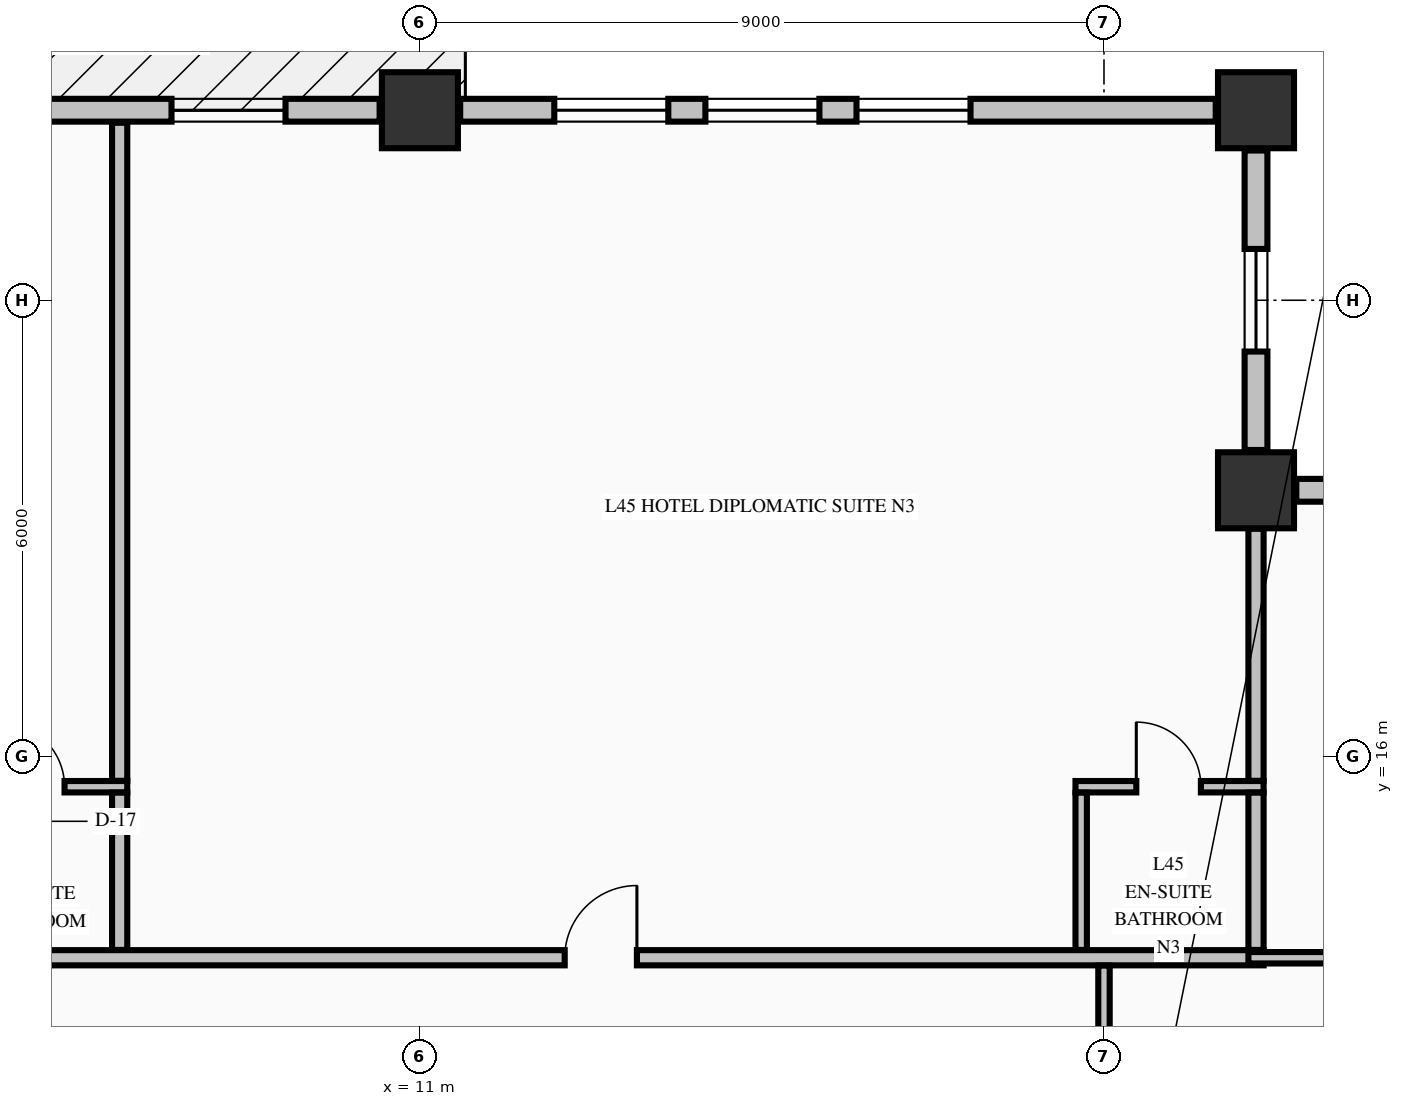
"""IFC4 building model, lengths in metres.
Left out: names, types, materials, properties, quantities, classifications, styles, units other than length and angle.
Written with IfcOpenShell. Run it as: python <this file> out.ifc"""

import sys

from ifc_helpers import new_model, si_unit, direction, frame, frame_2d, origin, origin_2d, place, context, subcontext, project, spatial, rectangle, extrude, element, fill, save


model = new_model("IFC4")
c1 = context("Model", 3, precision=1e-05, world=origin(), true_north=direction((0.0, 1.0)))
c2 = subcontext(c1, "Body", "Model", "MODEL_VIEW")
j1 = project(units=[si_unit("LENGTHUNIT", "METRE"), si_unit("PLANEANGLEUNIT", "RADIAN")], contexts=[c1])
p1 = place(None, origin())
s1 = spatial("IfcSite", under=j1, at=p1, CompositionType="ELEMENT")
p2 = place(p1, origin())
s2 = spatial("IfcBuilding", under=s1, at=p2, CompositionType="ELEMENT")
p3 = place(p2, frame((0.0, 0.0, 176.26)))
s3 = spatial("IfcBuildingStorey", under=s2, at=p3, CompositionType="ELEMENT", Elevation=176.26)
for number, where, z_axis, x_axis in (
    (1, (11.0, 24.5, -0.275), (0.0, 0.0, 1.0), (1.0, 0.0, 0.0)),
    (2, (22.0, 24.5, -0.275), (0.0, 0.0, 1.0), (1.0, 0.0, 0.0)),
    (3, (22.0, 19.5, -0.275), (0.0, 0.0, 1.0), (1.0, 0.0, 0.0)),
):
    element("IfcColumn", number, at=place(p3, frame(where, z_axis=z_axis, x_axis=x_axis)), inside=s3, PredefinedType="COLUMN", context=c2, shape_type="SweptSolid", body=[
        extrude(rectangle(XDim=1.0, YDim=1.0, at=origin_2d()), origin(), (0.0, 0.0, 1.0), 3.425),
    ])
p4 = place(p3, frame((26.47, 19.5, 0.0), z_axis=(0.0, 0.0, 1.0), x_axis=(-1.0, 0.0, 0.0)))
e4 = element("IfcWall", 4, at=p4, inside=s3, PredefinedType="STANDARD", context=c2, shape_type="SweptSolid", body=[
    extrude(rectangle(XDim=3.94, YDim=0.3, at=frame_2d((1.97, 0.0))), origin(), (0.0, 0.0, 1.0), 2.542),
])
p5 = place(p4, frame((1.295, 0.0, 0.68)))
e5 = element("IfcOpeningElement", 5, at=p5, cuts=e4, PredefinedType="OPENING", context=c2, shape_type="SweptSolid", body=[
    extrude(rectangle(XDim=1.35, YDim=1.42, at=frame_2d((0.675, 0.71))), frame((0.0, 0.16, 0.0), z_axis=(0.0, -1.0, 0.0), x_axis=(1.0, 0.0, 0.0)), (0.0, 0.0, 1.0), 0.32),
])
p6 = place(p3, frame((22.0, 20.03, 0.0), z_axis=(0.0, 0.0, 1.0), x_axis=(0.0, 1.0, 0.0)))
e6 = element("IfcWall", 6, at=p6, inside=s3, PredefinedType="STANDARD", context=c2, shape_type="SweptSolid", body=[
    extrude(rectangle(XDim=3.94, YDim=0.3, at=frame_2d((1.97, 0.0))), origin(), (0.0, 0.0, 1.0), 2.542),
])
p7 = place(p6, frame((1.295, 0.0, 0.68)))
e7 = element("IfcOpeningElement", 7, at=p7, cuts=e6, PredefinedType="OPENING", context=c2, shape_type="SweptSolid", body=[
    extrude(rectangle(XDim=1.35, YDim=1.42, at=frame_2d((0.675, 0.71))), frame((0.0, 0.16, 0.0), z_axis=(0.0, -1.0, 0.0), x_axis=(1.0, 0.0, 0.0)), (0.0, 0.0, 1.0), 0.32),
])
p8 = place(p3, frame((10.47, 24.5, 0.0), z_axis=(0.0, 0.0, 1.0), x_axis=(-1.0, 0.0, 0.0)))
e8 = element("IfcWall", 8, at=p8, inside=s3, PredefinedType="STANDARD", context=c2, shape_type="SweptSolid", body=[
    extrude(rectangle(XDim=9.94, YDim=0.3, at=frame_2d((4.97, 0.0))), origin(), (0.0, 0.0, 1.0), 2.542),
])
p9 = place(p8, frame((1.238, 0.0, 0.72)))
e9 = element("IfcOpeningElement", 9, at=p9, cuts=e8, PredefinedType="OPENING", context=c2, shape_type="SweptSolid", body=[
    extrude(rectangle(XDim=1.5, YDim=1.6, at=frame_2d((0.75, 0.8))), frame((0.0, 0.16, 0.0), z_axis=(0.0, -1.0, 0.0), x_axis=(1.0, 0.0, 0.0)), (0.0, 0.0, 1.0), 0.32),
])
p10 = place(p8, frame((5.214, 0.0, 0.72)))
e10 = element("IfcOpeningElement", 10, at=p10, cuts=e8, PredefinedType="OPENING", context=c2, shape_type="SweptSolid", body=[
    extrude(rectangle(XDim=1.5, YDim=1.6, at=frame_2d((0.75, 0.8))), frame((0.0, 0.16, 0.0), z_axis=(0.0, -1.0, 0.0), x_axis=(1.0, 0.0, 0.0)), (0.0, 0.0, 1.0), 0.32),
])
p11 = place(p8, frame((7.202, 0.0, 0.72)))
e11 = element("IfcOpeningElement", 11, at=p11, cuts=e8, PredefinedType="OPENING", context=c2, shape_type="SweptSolid", body=[
    extrude(rectangle(XDim=1.5, YDim=1.6, at=frame_2d((0.75, 0.8))), frame((0.0, 0.16, 0.0), z_axis=(0.0, -1.0, 0.0), x_axis=(1.0, 0.0, 0.0)), (0.0, 0.0, 1.0), 0.32),
])
p12 = place(p3, frame((21.47, 24.5, 0.0), z_axis=(0.0, 0.0, 1.0), x_axis=(-1.0, 0.0, 0.0)))
e12 = element("IfcWall", 12, at=p12, inside=s3, PredefinedType="STANDARD", context=c2, shape_type="SweptSolid", body=[
    extrude(rectangle(XDim=9.94, YDim=0.3, at=frame_2d((4.97, 0.0))), origin(), (0.0, 0.0, 1.0), 2.542),
])
p13 = place(p12, frame((3.226, 0.0, 0.72)))
e13 = element("IfcOpeningElement", 13, at=p13, cuts=e12, PredefinedType="OPENING", context=c2, shape_type="SweptSolid", body=[
    extrude(rectangle(XDim=1.5, YDim=1.6, at=frame_2d((0.75, 0.8))), frame((0.0, 0.16, 0.0), z_axis=(0.0, -1.0, 0.0), x_axis=(1.0, 0.0, 0.0)), (0.0, 0.0, 1.0), 0.32),
])
p14 = place(p12, frame((5.214, 0.0, 0.72)))
e14 = element("IfcOpeningElement", 14, at=p14, cuts=e12, PredefinedType="OPENING", context=c2, shape_type="SweptSolid", body=[
    extrude(rectangle(XDim=1.5, YDim=1.6, at=frame_2d((0.75, 0.8))), frame((0.0, 0.16, 0.0), z_axis=(0.0, -1.0, 0.0), x_axis=(1.0, 0.0, 0.0)), (0.0, 0.0, 1.0), 0.32),
])
p15 = place(p12, frame((7.202, 0.0, 0.72)))
e15 = element("IfcOpeningElement", 15, at=p15, cuts=e12, PredefinedType="OPENING", context=c2, shape_type="SweptSolid", body=[
    extrude(rectangle(XDim=1.5, YDim=1.6, at=frame_2d((0.75, 0.8))), frame((0.0, 0.16, 0.0), z_axis=(0.0, -1.0, 0.0), x_axis=(1.0, 0.0, 0.0)), (0.0, 0.0, 1.0), 0.32),
])
p16 = place(p3, frame((-17.1, 13.35, 0.0), z_axis=(0.0, 0.0, 1.0), x_axis=(1.0, 0.0, 0.0)))
e16 = element("IfcWall", 16, at=p16, inside=s3, PredefinedType="PARTITIONING", context=c2, shape_type="SweptSolid", body=[
    extrude(rectangle(XDim=39.2, YDim=0.2, at=frame_2d((19.6, 0.0))), origin(), (0.0, 0.0, 1.0), 3.15),
])
p17 = place(p16, frame((3.695, 0.0, 0.0)))
e17 = element("IfcOpeningElement", 17, at=p17, cuts=e16, PredefinedType="OPENING", context=c2, shape_type="SweptSolid", body=[
    extrude(rectangle(XDim=0.95, YDim=2.15, at=frame_2d((0.475, 1.075))), frame((0.0, 0.11, 0.0), z_axis=(0.0, -1.0, 0.0), x_axis=(1.0, 0.0, 0.0)), (0.0, 0.0, 1.0), 0.22),
])
p18 = place(p16, frame((19.725, 0.0, 0.0)))
e18 = element("IfcOpeningElement", 18, at=p18, cuts=e16, PredefinedType="OPENING", context=c2, shape_type="SweptSolid", body=[
    extrude(rectangle(XDim=0.95, YDim=2.15, at=frame_2d((0.475, 1.075))), frame((0.0, 0.11, 0.0), z_axis=(0.0, -1.0, 0.0), x_axis=(1.0, 0.0, 0.0)), (0.0, 0.0, 1.0), 0.22),
])
p19 = place(p16, frame((30.005, 0.0, 0.0)))
e19 = element("IfcOpeningElement", 19, at=p19, cuts=e16, PredefinedType="OPENING", context=c2, shape_type="SweptSolid", body=[
    extrude(rectangle(XDim=0.95, YDim=2.15, at=frame_2d((0.475, 1.075))), frame((0.0, 0.11, 0.0), z_axis=(0.0, -1.0, 0.0), x_axis=(1.0, 0.0, 0.0)), (0.0, 0.0, 1.0), 0.22),
])
p20 = place(p3, frame((21.9, 13.35, 0.0), z_axis=(0.0, 0.0, 1.0), x_axis=(1.0, 0.0, 0.0)))
e20 = element("IfcWall", 20, at=p20, inside=s3, PredefinedType="PARTITIONING", context=c2, shape_type="SweptSolid", body=[
    extrude(rectangle(XDim=4.935, YDim=0.15, at=frame_2d((2.468, 0.0))), origin(), (0.0, 0.0, 1.0), 3.15),
])
p21 = place(p3, frame((4.675, 15.6, 0.0), z_axis=(0.0, 0.0, 1.0), x_axis=(1.0, 0.0, 0.0)))
e21 = element("IfcWall", 21, at=p21, inside=s3, PredefinedType="PARTITIONING", context=c2, shape_type="SweptSolid", body=[
    extrude(rectangle(XDim=2.475, YDim=0.15, at=frame_2d((1.237, 0.0))), origin(), (0.0, 0.0, 1.0), 3.15),
])
p22 = place(p21, frame((0.8, 0.0, 0.0)))
e22 = element("IfcOpeningElement", 22, at=p22, cuts=e21, PredefinedType="OPENING", context=c2, shape_type="SweptSolid", body=[
    extrude(rectangle(XDim=0.85, YDim=2.1, at=frame_2d((0.425, 1.05))), frame((0.0, 0.085, 0.0), z_axis=(0.0, -1.0, 0.0), x_axis=(1.0, 0.0, 0.0)), (0.0, 0.0, 1.0), 0.17),
])
p23 = place(p3, frame((19.625, 15.6, 0.0), z_axis=(0.0, 0.0, 1.0), x_axis=(1.0, 0.0, 0.0)))
e23 = element("IfcWall", 23, at=p23, inside=s3, PredefinedType="PARTITIONING", context=c2, shape_type="SweptSolid", body=[
    extrude(rectangle(XDim=2.475, YDim=0.15, at=frame_2d((1.238, 0.0))), origin(), (0.0, 0.0, 1.0), 3.15),
])
p24 = place(p23, frame((0.8, 0.0, 0.0)))
e24 = element("IfcOpeningElement", 24, at=p24, cuts=e23, PredefinedType="OPENING", context=c2, shape_type="SweptSolid", body=[
    extrude(rectangle(XDim=0.85, YDim=2.1, at=frame_2d((0.425, 1.05))), frame((0.0, 0.085, 0.0), z_axis=(0.0, -1.0, 0.0), x_axis=(1.0, 0.0, 0.0)), (0.0, 0.0, 1.0), 0.17),
])
p25 = place(p3, frame((7.05, 13.453, 0.0), z_axis=(0.0, 0.0, 1.0), x_axis=(0.0, 1.0, 0.0)))
e25 = element("IfcWall", 25, at=p25, inside=s3, PredefinedType="PARTITIONING", context=c2, shape_type="SweptSolid", body=[
    extrude(rectangle(XDim=2.069, YDim=0.2, at=frame_2d((1.035, 0.0))), origin(), (0.0, 0.0, 1.0), 3.15),
])
p26 = place(p3, frame((7.05, 15.678, 0.0), z_axis=(0.0, 0.0, 1.0), x_axis=(0.0, 1.0, 0.0)))
e26 = element("IfcWall", 26, at=p26, inside=s3, PredefinedType="PARTITIONING", context=c2, shape_type="SweptSolid", body=[
    extrude(rectangle(XDim=8.657, YDim=0.2, at=frame_2d((4.329, 0.0))), origin(), (0.0, 0.0, 1.0), 3.15),
])
p27 = place(p3, frame((19.7, 13.453, 0.0), z_axis=(0.0, 0.0, 1.0), x_axis=(0.0, 1.0, 0.0)))
e27 = element("IfcWall", 27, at=p27, inside=s3, PredefinedType="PARTITIONING", context=c2, shape_type="SweptSolid", body=[
    extrude(rectangle(XDim=2.069, YDim=0.15, at=frame_2d((1.035, 0.0))), origin(), (0.0, 0.0, 1.0), 2.342),
])
p28 = place(p3, frame((20.0, 10.931, 0.0), z_axis=(0.0, 0.0, 1.0), x_axis=(0.0, 1.0, 0.0)))
e28 = element("IfcWall", 28, at=p28, inside=s3, PredefinedType="PARTITIONING", context=c2, shape_type="SweptSolid", body=[
    extrude(rectangle(XDim=2.316, YDim=0.15, at=frame_2d((1.158, 0.0))), origin(), (0.0, 0.0, 1.0), 2.342),
])
p29 = place(p28, frame((0.524, 0.0, 0.0)))
e29 = element("IfcOpeningElement", 29, at=p29, cuts=e28, PredefinedType="OPENING", context=c2, shape_type="SweptSolid", body=[
    extrude(rectangle(XDim=0.95, YDim=2.15, at=frame_2d((0.475, 1.075))), frame((0.0, 0.085, 0.0), z_axis=(0.0, -1.0, 0.0), x_axis=(1.0, 0.0, 0.0)), (0.0, 0.0, 1.0), 0.17),
])
p30 = place(p3, frame((22.0, 13.453, 0.0), z_axis=(0.0, 0.0, 1.0), x_axis=(0.0, 1.0, 0.0)))
e30 = element("IfcWall", 30, at=p30, inside=s3, PredefinedType="PARTITIONING", context=c2, shape_type="SweptSolid", body=[
    extrude(rectangle(XDim=2.069, YDim=0.2, at=frame_2d((1.035, 0.0))), origin(), (0.0, 0.0, 1.0), 3.15),
])
p31 = place(p3, frame((22.0, 15.678, 0.0), z_axis=(0.0, 0.0, 1.0), x_axis=(0.0, 1.0, 0.0)))
e31 = element("IfcWall", 31, at=p31, inside=s3, PredefinedType="PARTITIONING", context=c2, shape_type="SweptSolid", body=[
    extrude(rectangle(XDim=3.316, YDim=0.2, at=frame_2d((1.658, 0.0))), origin(), (0.0, 0.0, 1.0), 3.15),
])
p32 = place(p7, origin())
e32 = element("IfcWindow", 32, at=p32, inside=s3, PartitioningType="SINGLE_PANEL", PredefinedType="WINDOW", context=c2, shape_type="SweptSolid", body=[
    extrude(rectangle(XDim=1.35, YDim=1.42, at=frame_2d((0.675, 0.71))), frame((0.0, 0.03, 0.0), z_axis=(0.0, -1.0, 0.0), x_axis=(1.0, 0.0, 0.0)), (0.0, 0.0, 1.0), 0.06),
])
fill(e7, e32)
p33 = place(p9, origin())
e33 = element("IfcWindow", 33, at=p33, inside=s3, PartitioningType="SINGLE_PANEL", PredefinedType="WINDOW", context=c2, shape_type="SweptSolid", body=[
    extrude(rectangle(XDim=1.5, YDim=1.6, at=frame_2d((0.75, 0.8))), frame((0.0, 0.03, 0.0), z_axis=(0.0, -1.0, 0.0), x_axis=(1.0, 0.0, 0.0)), (0.0, 0.0, 1.0), 0.06),
])
fill(e9, e33)
p34 = place(p13, origin())
e34 = element("IfcWindow", 34, at=p34, inside=s3, PartitioningType="SINGLE_PANEL", PredefinedType="WINDOW", context=c2, shape_type="SweptSolid", body=[
    extrude(rectangle(XDim=1.5, YDim=1.6, at=frame_2d((0.75, 0.8))), frame((0.0, 0.03, 0.0), z_axis=(0.0, -1.0, 0.0), x_axis=(1.0, 0.0, 0.0)), (0.0, 0.0, 1.0), 0.06),
])
fill(e13, e34)
p35 = place(p14, origin())
e35 = element("IfcWindow", 35, at=p35, inside=s3, PartitioningType="SINGLE_PANEL", PredefinedType="WINDOW", context=c2, shape_type="SweptSolid", body=[
    extrude(rectangle(XDim=1.5, YDim=1.6, at=frame_2d((0.75, 0.8))), frame((0.0, 0.03, 0.0), z_axis=(0.0, -1.0, 0.0), x_axis=(1.0, 0.0, 0.0)), (0.0, 0.0, 1.0), 0.06),
])
fill(e14, e35)
p36 = place(p15, origin())
e36 = element("IfcWindow", 36, at=p36, inside=s3, PartitioningType="SINGLE_PANEL", PredefinedType="WINDOW", context=c2, shape_type="SweptSolid", body=[
    extrude(rectangle(XDim=1.5, YDim=1.6, at=frame_2d((0.75, 0.8))), frame((0.0, 0.03, 0.0), z_axis=(0.0, -1.0, 0.0), x_axis=(1.0, 0.0, 0.0)), (0.0, 0.0, 1.0), 0.06),
])
fill(e15, e36)
p37 = place(p22, origin())
e37 = element("IfcDoor", 37, at=p37, inside=s3, OperationType="SINGLE_SWING_LEFT", PredefinedType="DOOR", context=c2, shape_type="SweptSolid", body=[
    extrude(rectangle(XDim=0.85, YDim=2.1, at=frame_2d((0.425, 1.05))), frame((0.0, 0.025, 0.0), z_axis=(0.0, -1.0, 0.0), x_axis=(1.0, 0.0, 0.0)), (0.0, 0.0, 1.0), 0.05),
])
fill(e22, e37)
p38 = place(p19, origin())
e38 = element("IfcDoor", 38, at=p38, inside=s3, OperationType="SINGLE_SWING_RIGHT", PredefinedType="DOOR", context=c2, shape_type="SweptSolid", body=[
    extrude(rectangle(XDim=0.95, YDim=2.15, at=frame_2d((0.475, 1.075))), frame((0.0, 0.025, 0.0), z_axis=(0.0, -1.0, 0.0), x_axis=(1.0, 0.0, 0.0)), (0.0, 0.0, 1.0), 0.05),
])
fill(e19, e38)
p39 = place(p24, origin())
e39 = element("IfcDoor", 39, at=p39, inside=s3, OperationType="SINGLE_SWING_LEFT", PredefinedType="DOOR", context=c2, shape_type="SweptSolid", body=[
    extrude(rectangle(XDim=0.85, YDim=2.1, at=frame_2d((0.425, 1.05))), frame((0.0, 0.025, 0.0), z_axis=(0.0, -1.0, 0.0), x_axis=(1.0, 0.0, 0.0)), (0.0, 0.0, 1.0), 0.05),
])
fill(e24, e39)
save(model, sys.argv[1])
